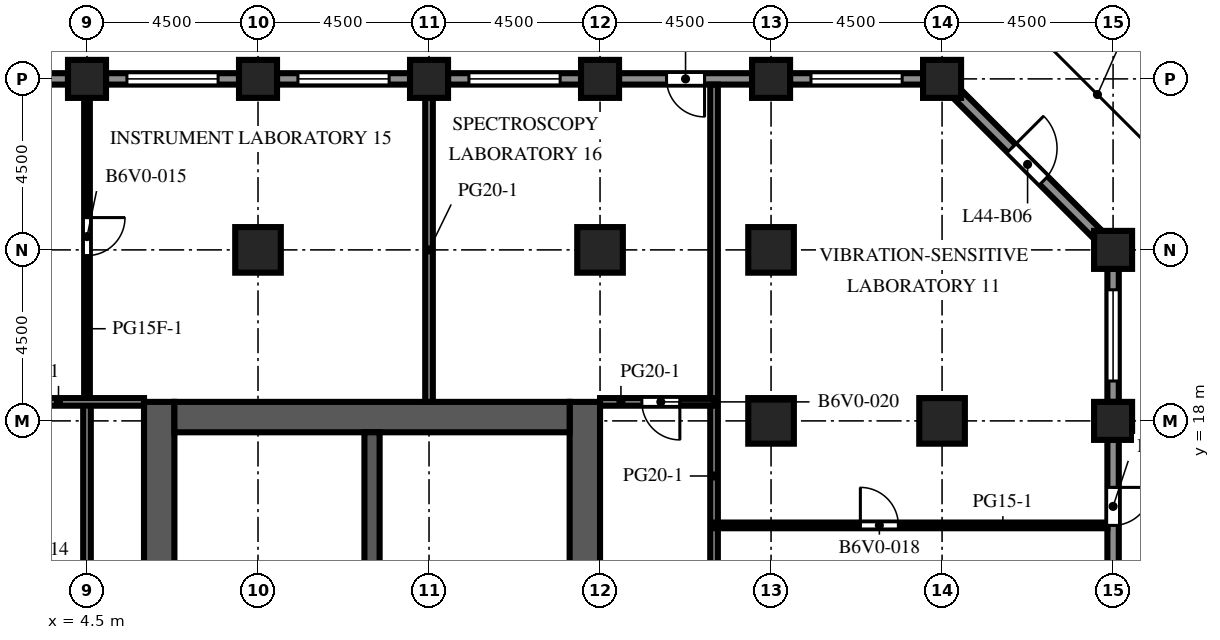
"""IFC4 building model, lengths in metres.
Left out: names, types, materials, properties, quantities, classifications, styles, units other than length and angle.
Written with IfcOpenShell. Run it as: python <this file> out.ifc"""

import sys

from ifc_helpers import new_model, si_unit, direction, frame, frame_2d, origin, origin_2d, place, context, subcontext, project, spatial, rectangle, extrude, element, fill, save


model = new_model("IFC4")
c1 = context("Model", 3, precision=1e-05, world=origin(), true_north=direction((0.0, 1.0)))
c2 = subcontext(c1, "Body", "Model", "MODEL_VIEW")
j1 = project(units=[si_unit("LENGTHUNIT", "METRE"), si_unit("PLANEANGLEUNIT", "RADIAN")], contexts=[c1])
p1 = place(None, origin())
s1 = spatial("IfcSite", under=j1, at=p1, CompositionType="ELEMENT")
p2 = place(p1, origin())
s2 = spatial("IfcBuilding", under=s1, at=p2, CompositionType="ELEMENT")
p3 = place(p2, frame((0.0, 0.0, 195.6)))
s3 = spatial("IfcBuildingStorey", under=s2, at=p3, CompositionType="ELEMENT", Elevation=195.6)
for number, where, z_axis, x_axis in (
    (1, (4.5, 27.0, 0.0), (0.0, 0.0, 1.0), (1.0, 0.0, 0.0)),
    (2, (9.0, 27.0, 0.0), (0.0, 0.0, 1.0), (1.0, 0.0, 0.0)),
    (3, (13.5, 27.0, 0.0), (0.0, 0.0, 1.0), (1.0, 0.0, 0.0)),
    (4, (18.0, 27.0, 0.0), (0.0, 0.0, 1.0), (1.0, 0.0, 0.0)),
    (5, (22.5, 27.0, 0.0), (0.0, 0.0, 1.0), (1.0, 0.0, 0.0)),
    (6, (27.0, 27.0, 0.0), (0.0, 0.0, 1.0), (1.0, 0.0, 0.0)),
    (7, (31.5, 18.0, 0.0), (0.0, 0.0, 1.0), (1.0, 0.0, 0.0)),
    (8, (31.5, 22.5, 0.0), (0.0, 0.0, 1.0), (1.0, 0.0, 0.0)),
):
    element("IfcColumn", number, at=place(p3, frame(where, z_axis=z_axis, x_axis=x_axis)), inside=s3, PredefinedType="COLUMN", context=c2, shape_type="SweptSolid", body=[
        extrude(rectangle(XDim=1.0, YDim=1.0, at=origin_2d()), origin(), (0.0, 0.0, 1.0), 4.1),
    ])
for number, where, z_axis, x_axis in (
    (9, (9.0, 22.5, 0.0), (0.0, 0.0, 1.0), (1.0, 0.0, 0.0)),
    (10, (18.0, 22.5, 0.0), (0.0, 0.0, 1.0), (1.0, 0.0, 0.0)),
    (11, (22.5, 18.0, 0.0), (0.0, 0.0, 1.0), (1.0, 0.0, 0.0)),
    (12, (22.5, 22.5, 0.0), (0.0, 0.0, 1.0), (1.0, 0.0, 0.0)),
    (13, (27.0, 18.0, 0.0), (0.0, 0.0, 1.0), (1.0, 0.0, 0.0)),
):
    element("IfcColumn", number, at=place(p3, frame(where, z_axis=z_axis, x_axis=x_axis)), inside=s3, PredefinedType="COLUMN", context=c2, shape_type="SweptSolid", body=[
        extrude(rectangle(XDim=1.2, YDim=1.2, at=origin_2d()), origin(), (0.0, 0.0, 1.0), 4.1),
    ])
p4 = place(p3, frame((6.4, -9.0, 0.0), z_axis=(0.0, 0.0, 1.0), x_axis=(0.0, 1.0, 0.0)))
e14 = element("IfcWall", 14, at=p4, inside=s3, PredefinedType="SHEAR", context=c2, shape_type="SweptSolid", body=[
    extrude(rectangle(XDim=27.5, YDim=0.8, at=frame_2d((13.75, 0.0))), origin(), (0.0, 0.0, 1.0), 4.1),
])
p5 = place(p4, frame((12.55, 0.0, 0.0)))
e15 = element("IfcOpeningElement", 15, at=p5, cuts=e14, PredefinedType="OPENING", context=c2, shape_type="SweptSolid", body=[
    extrude(rectangle(XDim=2.4, YDim=2.4, at=frame_2d((1.2, 1.2))), frame((0.0, 0.41, 0.0), z_axis=(0.0, -1.0, 0.0), x_axis=(1.0, 0.0, 0.0)), (0.0, 0.0, 1.0), 0.82),
])
p6 = place(p4, frame((3.95, 0.0, 0.0)))
e16 = element("IfcOpeningElement", 16, at=p6, cuts=e14, PredefinedType="OPENING", context=c2, shape_type="SweptSolid", body=[
    extrude(rectangle(XDim=1.2, YDim=2.1, at=frame_2d((0.6, 1.05))), frame((0.0, 0.41, 0.0), z_axis=(0.0, -1.0, 0.0), x_axis=(1.0, 0.0, 0.0)), (0.0, 0.0, 1.0), 0.82),
])
p7 = place(p4, frame((19.45, 0.0, 0.0)))
e17 = element("IfcOpeningElement", 17, at=p7, cuts=e14, PredefinedType="OPENING", context=c2, shape_type="SweptSolid", body=[
    extrude(rectangle(XDim=1.0, YDim=2.1, at=frame_2d((0.5, 1.05))), frame((0.0, 0.41, 0.0), z_axis=(0.0, -1.0, 0.0), x_axis=(1.0, 0.0, 0.0)), (0.0, 0.0, 1.0), 0.82),
])
p8 = place(p4, frame((21.137, 0.0, 0.0)))
e18 = element("IfcOpeningElement", 18, at=p8, cuts=e14, PredefinedType="OPENING", context=c2, shape_type="SweptSolid", body=[
    extrude(rectangle(XDim=1.0, YDim=2.1, at=frame_2d((0.5, 1.05))), frame((0.0, 0.41, 0.0), z_axis=(0.0, -1.0, 0.0), x_axis=(1.0, 0.0, 0.0)), (0.0, 0.0, 1.0), 0.82),
])
p9 = place(p4, frame((23.2, 0.0, 0.0)))
e19 = element("IfcOpeningElement", 19, at=p9, cuts=e14, PredefinedType="OPENING", context=c2, shape_type="SweptSolid", body=[
    extrude(rectangle(XDim=1.0, YDim=2.1, at=frame_2d((0.5, 1.05))), frame((0.0, 0.41, 0.0), z_axis=(0.0, -1.0, 0.0), x_axis=(1.0, 0.0, 0.0)), (0.0, 0.0, 1.0), 0.82),
])
p10 = place(p4, frame((25.262, 0.0, 0.0)))
e20 = element("IfcOpeningElement", 20, at=p10, cuts=e14, PredefinedType="OPENING", context=c2, shape_type="SweptSolid", body=[
    extrude(rectangle(XDim=1.0, YDim=2.1, at=frame_2d((0.5, 1.05))), frame((0.0, 0.41, 0.0), z_axis=(0.0, -1.0, 0.0), x_axis=(1.0, 0.0, 0.0)), (0.0, 0.0, 1.0), 0.82),
])
p11 = place(p3, frame((17.6, -9.0, 0.0), z_axis=(0.0, 0.0, 1.0), x_axis=(0.0, 1.0, 0.0)))
e21 = element("IfcWall", 21, at=p11, inside=s3, PredefinedType="SHEAR", context=c2, shape_type="SweptSolid", body=[
    extrude(rectangle(XDim=27.5, YDim=0.8, at=frame_2d((13.75, 0.0))), origin(), (0.0, 0.0, 1.0), 4.1),
])
p12 = place(p11, frame((12.55, 0.0, 0.0)))
e22 = element("IfcOpeningElement", 22, at=p12, cuts=e21, PredefinedType="OPENING", context=c2, shape_type="SweptSolid", body=[
    extrude(rectangle(XDim=2.4, YDim=2.4, at=frame_2d((1.2, 1.2))), frame((0.0, 0.41, 0.0), z_axis=(0.0, -1.0, 0.0), x_axis=(1.0, 0.0, 0.0)), (0.0, 0.0, 1.0), 0.82),
])
p13 = place(p11, frame((6.825, 0.0, 0.0)))
e23 = element("IfcOpeningElement", 23, at=p13, cuts=e21, PredefinedType="OPENING", context=c2, shape_type="SweptSolid", body=[
    extrude(rectangle(XDim=1.2, YDim=2.1, at=frame_2d((0.6, 1.05))), frame((0.0, 0.41, 0.0), z_axis=(0.0, -1.0, 0.0), x_axis=(1.0, 0.0, 0.0)), (0.0, 0.0, 1.0), 0.82),
])
p14 = place(p11, frame((19.475, 0.0, 0.0)))
e24 = element("IfcOpeningElement", 24, at=p14, cuts=e21, PredefinedType="OPENING", context=c2, shape_type="SweptSolid", body=[
    extrude(rectangle(XDim=1.2, YDim=2.1, at=frame_2d((0.6, 1.05))), frame((0.0, 0.41, 0.0), z_axis=(0.0, -1.0, 0.0), x_axis=(1.0, 0.0, 0.0)), (0.0, 0.0, 1.0), 0.82),
])
p15 = place(p3, frame((6.8, 18.1, 0.0), z_axis=(0.0, 0.0, 1.0), x_axis=(1.0, 0.0, 0.0)))
e25 = element("IfcWall", 25, at=p15, inside=s3, PredefinedType="SHEAR", context=c2, shape_type="SweptSolid", body=[
    extrude(rectangle(XDim=10.4, YDim=0.8, at=frame_2d((5.2, 0.0))), origin(), (0.0, 0.0, 1.0), 4.1),
])
p16 = place(p3, frame((12.0, 10.2, 0.0), z_axis=(0.0, 0.0, 1.0), x_axis=(0.0, 1.0, 0.0)))
e26 = element("IfcWall", 26, at=p16, inside=s3, PredefinedType="SHEAR", context=c2, shape_type="SweptSolid", body=[
    extrude(rectangle(XDim=7.5, YDim=0.4, at=frame_2d((3.75, 0.0))), origin(), (0.0, 0.0, 1.0), 4.1),
])
p17 = place(p3, frame((31.5, 17.5, 0.0), z_axis=(0.0, 0.0, 1.0), x_axis=(0.0, -1.0, 0.0)))
e27 = element("IfcWall", 27, at=p17, inside=s3, PredefinedType="SOLIDWALL", context=c2, shape_type="SweptSolid", body=[
    extrude(rectangle(XDim=3.5, YDim=0.3, at=frame_2d((1.75, 0.0))), origin(), (0.0, 0.0, 1.0), 2.85),
])
p18 = place(p17, frame((1.25, 0.0, 0.0)))
e28 = element("IfcOpeningElement", 28, at=p18, cuts=e27, PredefinedType="OPENING", context=c2, shape_type="SweptSolid", body=[
    extrude(rectangle(XDim=1.0, YDim=2.2, at=frame_2d((0.5, 1.1))), frame((0.0, 0.16, 0.0), z_axis=(0.0, -1.0, 0.0), x_axis=(1.0, 0.0, 0.0)), (0.0, 0.0, 1.0), 0.32),
])
p19 = place(p3, frame((31.5, 22.0, 0.0), z_axis=(0.0, 0.0, 1.0), x_axis=(0.0, -1.0, 0.0)))
e29 = element("IfcWall", 29, at=p19, inside=s3, PredefinedType="SOLIDWALL", context=c2, shape_type="SweptSolid", body=[
    extrude(rectangle(XDim=3.5, YDim=0.3, at=frame_2d((1.75, 0.0))), origin(), (0.0, 0.0, 1.0), 2.85),
])
p20 = place(p19, frame((0.55, 0.0, 0.8)))
e30 = element("IfcOpeningElement", 30, at=p20, cuts=e29, PredefinedType="OPENING", context=c2, shape_type="SweptSolid", body=[
    extrude(rectangle(XDim=2.4, YDim=1.7, at=frame_2d((1.2, 0.85))), frame((0.0, 0.16, 0.0), z_axis=(0.0, -1.0, 0.0), x_axis=(1.0, 0.0, 0.0)), (0.0, 0.0, 1.0), 0.32),
])
p21 = place(p3, frame((27.394, 26.606, 0.0), z_axis=(0.0, 0.0, 1.0), x_axis=(0.707106781187, -0.707106781187, 0.0)))
e31 = element("IfcWall", 31, at=p21, inside=s3, PredefinedType="SOLIDWALL", context=c2, shape_type="SweptSolid", body=[
    extrude(rectangle(XDim=5.25, YDim=0.3, at=frame_2d((2.625, 0.0))), origin(), (0.0, 0.0, 1.0), 2.85),
])
p22 = place(p21, frame((2.025, 0.0, 0.0)))
e32 = element("IfcOpeningElement", 32, at=p22, cuts=e31, PredefinedType="OPENING", context=c2, shape_type="SweptSolid", body=[
    extrude(rectangle(XDim=1.2, YDim=2.2, at=frame_2d((0.6, 1.1))), frame((0.0, 0.16, 0.0), z_axis=(0.0, -1.0, 0.0), x_axis=(1.0, 0.0, 0.0)), (0.0, 0.0, 1.0), 0.32),
])
p23 = place(p3, frame((23.0, 27.0, 0.0), z_axis=(0.0, 0.0, 1.0), x_axis=(1.0, 0.0, 0.0)))
e33 = element("IfcWall", 33, at=p23, inside=s3, PredefinedType="SOLIDWALL", context=c2, shape_type="SweptSolid", body=[
    extrude(rectangle(XDim=3.5, YDim=0.3, at=frame_2d((1.75, 0.0))), origin(), (0.0, 0.0, 1.0), 2.85),
])
p24 = place(p23, frame((0.55, 0.0, 0.8)))
e34 = element("IfcOpeningElement", 34, at=p24, cuts=e33, PredefinedType="OPENING", context=c2, shape_type="SweptSolid", body=[
    extrude(rectangle(XDim=2.4, YDim=1.7, at=frame_2d((1.2, 0.85))), frame((0.0, 0.16, 0.0), z_axis=(0.0, -1.0, 0.0), x_axis=(1.0, 0.0, 0.0)), (0.0, 0.0, 1.0), 0.32),
])
p25 = place(p3, frame((18.5, 27.0, 0.0), z_axis=(0.0, 0.0, 1.0), x_axis=(1.0, 0.0, 0.0)))
e35 = element("IfcWall", 35, at=p25, inside=s3, PredefinedType="SOLIDWALL", context=c2, shape_type="SweptSolid", body=[
    extrude(rectangle(XDim=3.5, YDim=0.3, at=frame_2d((1.75, 0.0))), origin(), (0.0, 0.0, 1.0), 2.85),
])
p26 = place(p25, frame((1.25, 0.0, 0.0)))
e36 = element("IfcOpeningElement", 36, at=p26, cuts=e35, PredefinedType="OPENING", context=c2, shape_type="SweptSolid", body=[
    extrude(rectangle(XDim=1.0, YDim=2.2, at=frame_2d((0.5, 1.1))), frame((0.0, 0.16, 0.0), z_axis=(0.0, -1.0, 0.0), x_axis=(1.0, 0.0, 0.0)), (0.0, 0.0, 1.0), 0.32),
])
p27 = place(p3, frame((14.0, 27.0, 0.0), z_axis=(0.0, 0.0, 1.0), x_axis=(1.0, 0.0, 0.0)))
e37 = element("IfcWall", 37, at=p27, inside=s3, PredefinedType="SOLIDWALL", context=c2, shape_type="SweptSolid", body=[
    extrude(rectangle(XDim=3.5, YDim=0.3, at=frame_2d((1.75, 0.0))), origin(), (0.0, 0.0, 1.0), 2.85),
])
p28 = place(p27, frame((0.55, 0.0, 0.8)))
e38 = element("IfcOpeningElement", 38, at=p28, cuts=e37, PredefinedType="OPENING", context=c2, shape_type="SweptSolid", body=[
    extrude(rectangle(XDim=2.4, YDim=1.7, at=frame_2d((1.2, 0.85))), frame((0.0, 0.16, 0.0), z_axis=(0.0, -1.0, 0.0), x_axis=(1.0, 0.0, 0.0)), (0.0, 0.0, 1.0), 0.32),
])
p29 = place(p3, frame((9.5, 27.0, 0.0), z_axis=(0.0, 0.0, 1.0), x_axis=(1.0, 0.0, 0.0)))
e39 = element("IfcWall", 39, at=p29, inside=s3, PredefinedType="SOLIDWALL", context=c2, shape_type="SweptSolid", body=[
    extrude(rectangle(XDim=3.5, YDim=0.3, at=frame_2d((1.75, 0.0))), origin(), (0.0, 0.0, 1.0), 2.85),
])
p30 = place(p29, frame((0.55, 0.0, 0.8)))
e40 = element("IfcOpeningElement", 40, at=p30, cuts=e39, PredefinedType="OPENING", context=c2, shape_type="SweptSolid", body=[
    extrude(rectangle(XDim=2.4, YDim=1.7, at=frame_2d((1.2, 0.85))), frame((0.0, 0.16, 0.0), z_axis=(0.0, -1.0, 0.0), x_axis=(1.0, 0.0, 0.0)), (0.0, 0.0, 1.0), 0.32),
])
p31 = place(p3, frame((5.0, 27.0, 0.0), z_axis=(0.0, 0.0, 1.0), x_axis=(1.0, 0.0, 0.0)))
e41 = element("IfcWall", 41, at=p31, inside=s3, PredefinedType="SOLIDWALL", context=c2, shape_type="SweptSolid", body=[
    extrude(rectangle(XDim=3.5, YDim=0.3, at=frame_2d((1.75, 0.0))), origin(), (0.0, 0.0, 1.0), 2.85),
])
p32 = place(p31, frame((0.55, 0.0, 0.8)))
e42 = element("IfcOpeningElement", 42, at=p32, cuts=e41, PredefinedType="OPENING", context=c2, shape_type="SweptSolid", body=[
    extrude(rectangle(XDim=2.4, YDim=1.7, at=frame_2d((1.2, 0.85))), frame((0.0, 0.16, 0.0), z_axis=(0.0, -1.0, 0.0), x_axis=(1.0, 0.0, 0.0)), (0.0, 0.0, 1.0), 0.32),
])
p33 = place(p3, frame((0.5, 27.0, 0.0), z_axis=(0.0, 0.0, 1.0), x_axis=(1.0, 0.0, 0.0)))
e43 = element("IfcWall", 43, at=p33, inside=s3, PredefinedType="SOLIDWALL", context=c2, shape_type="SweptSolid", body=[
    extrude(rectangle(XDim=3.5, YDim=0.3, at=frame_2d((1.75, 0.0))), origin(), (0.0, 0.0, 1.0), 2.85),
])
p34 = place(p33, frame((0.55, 0.0, 0.8)))
e44 = element("IfcOpeningElement", 44, at=p34, cuts=e43, PredefinedType="OPENING", context=c2, shape_type="SweptSolid", body=[
    extrude(rectangle(XDim=2.4, YDim=1.7, at=frame_2d((1.2, 0.85))), frame((0.0, 0.16, 0.0), z_axis=(0.0, -1.0, 0.0), x_axis=(1.0, 0.0, 0.0)), (0.0, 0.0, 1.0), 0.32),
])
p35 = place(p3, frame((6.8, 15.825, 0.0), z_axis=(0.0, 0.0, 1.0), x_axis=(1.0, 0.0, 0.0)))
e45 = element("IfcWall", 45, at=p35, inside=s3, PredefinedType="PARTITIONING", context=c2, shape_type="SweptSolid", body=[
    extrude(rectangle(XDim=5.0, YDim=0.1, at=frame_2d((2.5, 0.0))), origin(), (0.0, 0.0, 1.0), 3.65),
])
p36 = place(p3, frame((4.5, 26.5, 0.0), z_axis=(0.0, 0.0, 1.0), x_axis=(0.0, -1.0, 0.0)))
e46 = element("IfcWall", 46, at=p36, inside=s3, PredefinedType="PARTITIONING", context=c2, shape_type="SweptSolid", body=[
    extrude(rectangle(XDim=8.0, YDim=0.15, at=frame_2d((4.0, 0.0))), origin(), (0.0, 0.0, 1.0), 3.65),
])
p37 = place(p36, frame((3.15, 0.0, 0.0)))
e47 = element("IfcOpeningElement", 47, at=p37, cuts=e46, PredefinedType="OPENING", context=c2, shape_type="SweptSolid", body=[
    extrude(rectangle(XDim=1.0, YDim=2.1, at=frame_2d((0.5, 1.05))), frame((0.0, 0.085, 0.0), z_axis=(0.0, -1.0, 0.0), x_axis=(1.0, 0.0, 0.0)), (0.0, 0.0, 1.0), 0.17),
])
p38 = place(p3, frame((4.5, 18.5, 0.0), z_axis=(0.0, 0.0, 1.0), x_axis=(0.0, -1.0, 0.0)))
e48 = element("IfcWall", 48, at=p38, inside=s3, PredefinedType="PARTITIONING", context=c2, shape_type="SweptSolid", body=[
    extrude(rectangle(XDim=11.8, YDim=0.2, at=frame_2d((5.9, 0.0))), origin(), (0.0, 0.0, 1.0), 3.65),
])
p39 = place(p38, frame((4.95, 0.0, 0.0)))
e49 = element("IfcOpeningElement", 49, at=p39, cuts=e48, PredefinedType="OPENING", context=c2, shape_type="SweptSolid", body=[
    extrude(rectangle(XDim=1.0, YDim=2.1, at=frame_2d((0.5, 1.05))), frame((0.0, 0.11, 0.0), z_axis=(0.0, -1.0, 0.0), x_axis=(1.0, 0.0, 0.0)), (0.0, 0.0, 1.0), 0.22),
])
p40 = place(p3, frame((13.5, 18.5, 0.0), z_axis=(0.0, 0.0, 1.0), x_axis=(0.0, 1.0, 0.0)))
e50 = element("IfcWall", 50, at=p40, inside=s3, PredefinedType="PARTITIONING", context=c2, shape_type="SweptSolid", body=[
    extrude(rectangle(XDim=8.0, YDim=0.2, at=frame_2d((4.0, 0.0))), origin(), (0.0, 0.0, 1.0), 3.65),
])
p41 = place(p3, frame((21.0, 6.25, 0.0), z_axis=(0.0, 0.0, 1.0), x_axis=(0.0, 1.0, 0.0)))
e51 = element("IfcWall", 51, at=p41, inside=s3, PredefinedType="PARTITIONING", context=c2, shape_type="SweptSolid", body=[
    extrude(rectangle(XDim=20.6, YDim=0.2, at=frame_2d((10.3, 0.0))), origin(), (0.0, 0.0, 1.0), 3.65),
])
p42 = place(p3, frame((21.0, 15.25, 0.0), z_axis=(0.0, 0.0, 1.0), x_axis=(1.0, 0.0, 0.0)))
e52 = element("IfcWall", 52, at=p42, inside=s3, PredefinedType="PARTITIONING", context=c2, shape_type="SweptSolid", body=[
    extrude(rectangle(XDim=10.35, YDim=0.15, at=frame_2d((5.175, 0.0))), origin(), (0.0, 0.0, 1.0), 3.65),
])
p43 = place(p42, frame((3.85, 0.0, 0.0)))
e53 = element("IfcOpeningElement", 53, at=p43, cuts=e52, PredefinedType="OPENING", context=c2, shape_type="SweptSolid", body=[
    extrude(rectangle(XDim=1.0, YDim=2.1, at=frame_2d((0.5, 1.05))), frame((0.0, 0.085, 0.0), z_axis=(0.0, -1.0, 0.0), x_axis=(1.0, 0.0, 0.0)), (0.0, 0.0, 1.0), 0.17),
])
p44 = place(p3, frame((1.5, 18.5, 0.0), z_axis=(0.0, 0.0, 1.0), x_axis=(1.0, 0.0, 0.0)))
e54 = element("IfcWall", 54, at=p44, inside=s3, PredefinedType="PARTITIONING", context=c2, shape_type="SweptSolid", body=[
    extrude(rectangle(XDim=4.5, YDim=0.2, at=frame_2d((2.25, 0.0))), origin(), (0.0, 0.0, 1.0), 3.65),
])
p45 = place(p3, frame((18.0, 18.5, 0.0), z_axis=(0.0, 0.0, 1.0), x_axis=(1.0, 0.0, 0.0)))
e55 = element("IfcWall", 55, at=p45, inside=s3, PredefinedType="PARTITIONING", context=c2, shape_type="SweptSolid", body=[
    extrude(rectangle(XDim=3.0, YDim=0.2, at=frame_2d((1.5, 0.0))), origin(), (0.0, 0.0, 1.0), 3.65),
])
p46 = place(p45, frame((1.1, 0.0, 0.0)))
e56 = element("IfcOpeningElement", 56, at=p46, cuts=e55, PredefinedType="OPENING", context=c2, shape_type="SweptSolid", body=[
    extrude(rectangle(XDim=1.0, YDim=2.1, at=frame_2d((0.5, 1.05))), frame((0.0, 0.11, 0.0), z_axis=(0.0, -1.0, 0.0), x_axis=(1.0, 0.0, 0.0)), (0.0, 0.0, 1.0), 0.22),
])
p47 = place(p18, origin())
e57 = element("IfcDoor", 57, at=p47, inside=s3, OperationType="SINGLE_SWING_LEFT", PredefinedType="DOOR", context=c2, shape_type="SweptSolid", body=[
    extrude(rectangle(XDim=1.0, YDim=2.2, at=frame_2d((0.5, 1.1))), frame((0.0, 0.025, 0.0), z_axis=(0.0, -1.0, 0.0), x_axis=(1.0, 0.0, 0.0)), (0.0, 0.0, 1.0), 0.05),
])
fill(e28, e57)
p48 = place(p20, origin())
e58 = element("IfcWindow", 58, at=p48, inside=s3, PartitioningType="SINGLE_PANEL", PredefinedType="WINDOW", context=c2, shape_type="SweptSolid", body=[
    extrude(rectangle(XDim=2.4, YDim=1.7, at=frame_2d((1.2, 0.85))), frame((0.0, 0.03, 0.0), z_axis=(0.0, -1.0, 0.0), x_axis=(1.0, 0.0, 0.0)), (0.0, 0.0, 1.0), 0.06),
])
fill(e30, e58)
p49 = place(p22, origin())
e59 = element("IfcDoor", 59, at=p49, inside=s3, OperationType="SINGLE_SWING_LEFT", PredefinedType="DOOR", context=c2, shape_type="SweptSolid", body=[
    extrude(rectangle(XDim=1.2, YDim=2.2, at=frame_2d((0.6, 1.1))), frame((0.0, 0.025, 0.0), z_axis=(0.0, -1.0, 0.0), x_axis=(1.0, 0.0, 0.0)), (0.0, 0.0, 1.0), 0.05),
])
fill(e32, e59)
p50 = place(p24, origin())
e60 = element("IfcWindow", 60, at=p50, inside=s3, PartitioningType="SINGLE_PANEL", PredefinedType="WINDOW", context=c2, shape_type="SweptSolid", body=[
    extrude(rectangle(XDim=2.4, YDim=1.7, at=frame_2d((1.2, 0.85))), frame((0.0, 0.03, 0.0), z_axis=(0.0, -1.0, 0.0), x_axis=(1.0, 0.0, 0.0)), (0.0, 0.0, 1.0), 0.06),
])
fill(e34, e60)
p51 = place(p26, origin())
e61 = element("IfcDoor", 61, at=p51, inside=s3, OperationType="SINGLE_SWING_RIGHT", PredefinedType="DOOR", context=c2, shape_type="SweptSolid", body=[
    extrude(rectangle(XDim=1.0, YDim=2.2, at=frame_2d((0.5, 1.1))), frame((0.0, 0.025, 0.0), z_axis=(0.0, -1.0, 0.0), x_axis=(1.0, 0.0, 0.0)), (0.0, 0.0, 1.0), 0.05),
])
fill(e36, e61)
p52 = place(p28, origin())
e62 = element("IfcWindow", 62, at=p52, inside=s3, PartitioningType="SINGLE_PANEL", PredefinedType="WINDOW", context=c2, shape_type="SweptSolid", body=[
    extrude(rectangle(XDim=2.4, YDim=1.7, at=frame_2d((1.2, 0.85))), frame((0.0, 0.03, 0.0), z_axis=(0.0, -1.0, 0.0), x_axis=(1.0, 0.0, 0.0)), (0.0, 0.0, 1.0), 0.06),
])
fill(e38, e62)
p53 = place(p30, origin())
e63 = element("IfcWindow", 63, at=p53, inside=s3, PartitioningType="SINGLE_PANEL", PredefinedType="WINDOW", context=c2, shape_type="SweptSolid", body=[
    extrude(rectangle(XDim=2.4, YDim=1.7, at=frame_2d((1.2, 0.85))), frame((0.0, 0.03, 0.0), z_axis=(0.0, -1.0, 0.0), x_axis=(1.0, 0.0, 0.0)), (0.0, 0.0, 1.0), 0.06),
])
fill(e40, e63)
p54 = place(p32, origin())
e64 = element("IfcWindow", 64, at=p54, inside=s3, PartitioningType="SINGLE_PANEL", PredefinedType="WINDOW", context=c2, shape_type="SweptSolid", body=[
    extrude(rectangle(XDim=2.4, YDim=1.7, at=frame_2d((1.2, 0.85))), frame((0.0, 0.03, 0.0), z_axis=(0.0, -1.0, 0.0), x_axis=(1.0, 0.0, 0.0)), (0.0, 0.0, 1.0), 0.06),
])
fill(e42, e64)
p55 = place(p9, origin())
e65 = element("IfcDoor", 65, at=p55, inside=s3, OperationType="SINGLE_SWING_RIGHT", PredefinedType="DOOR", context=c2, shape_type="SweptSolid", body=[
    extrude(rectangle(XDim=1.0, YDim=2.1, at=frame_2d((0.5, 1.05))), frame((0.0, -0.325, 0.0), z_axis=(0.0, -1.0, 0.0), x_axis=(1.0, 0.0, 0.0)), (0.0, 0.0, 1.0), 0.05),
])
fill(e19, e65)
p56 = place(p10, origin())
e66 = element("IfcDoor", 66, at=p56, inside=s3, OperationType="SINGLE_SWING_LEFT", PredefinedType="DOOR", context=c2, shape_type="SweptSolid", body=[
    extrude(rectangle(XDim=1.0, YDim=2.1, at=frame_2d((0.5, 1.05))), frame((0.0, -0.325, 0.0), z_axis=(0.0, -1.0, 0.0), x_axis=(1.0, 0.0, 0.0)), (0.0, 0.0, 1.0), 0.05),
])
fill(e20, e66)
p57 = place(p37, origin())
e67 = element("IfcDoor", 67, at=p57, inside=s3, OperationType="SINGLE_SWING_LEFT", PredefinedType="DOOR", context=c2, shape_type="SweptSolid", body=[
    extrude(rectangle(XDim=1.0, YDim=2.1, at=frame_2d((0.5, 1.05))), frame((0.0, 0.025, 0.0), z_axis=(0.0, -1.0, 0.0), x_axis=(1.0, 0.0, 0.0)), (0.0, 0.0, 1.0), 0.05),
])
fill(e47, e67)
p58 = place(p43, origin())
e68 = element("IfcDoor", 68, at=p58, inside=s3, OperationType="SINGLE_SWING_LEFT", PredefinedType="DOOR", context=c2, shape_type="SweptSolid", body=[
    extrude(rectangle(XDim=1.0, YDim=2.1, at=frame_2d((0.5, 1.05))), frame((0.0, 0.025, 0.0), z_axis=(0.0, -1.0, 0.0), x_axis=(1.0, 0.0, 0.0)), (0.0, 0.0, 1.0), 0.05),
])
fill(e53, e68)
p59 = place(p46, origin())
e69 = element("IfcDoor", 69, at=p59, inside=s3, OperationType="SINGLE_SWING_RIGHT", PredefinedType="DOOR", context=c2, shape_type="SweptSolid", body=[
    extrude(rectangle(XDim=1.0, YDim=2.1, at=frame_2d((0.5, 1.05))), frame((0.0, 0.025, 0.0), z_axis=(0.0, -1.0, 0.0), x_axis=(1.0, 0.0, 0.0)), (0.0, 0.0, 1.0), 0.05),
])
fill(e56, e69)
save(model, sys.argv[1])
